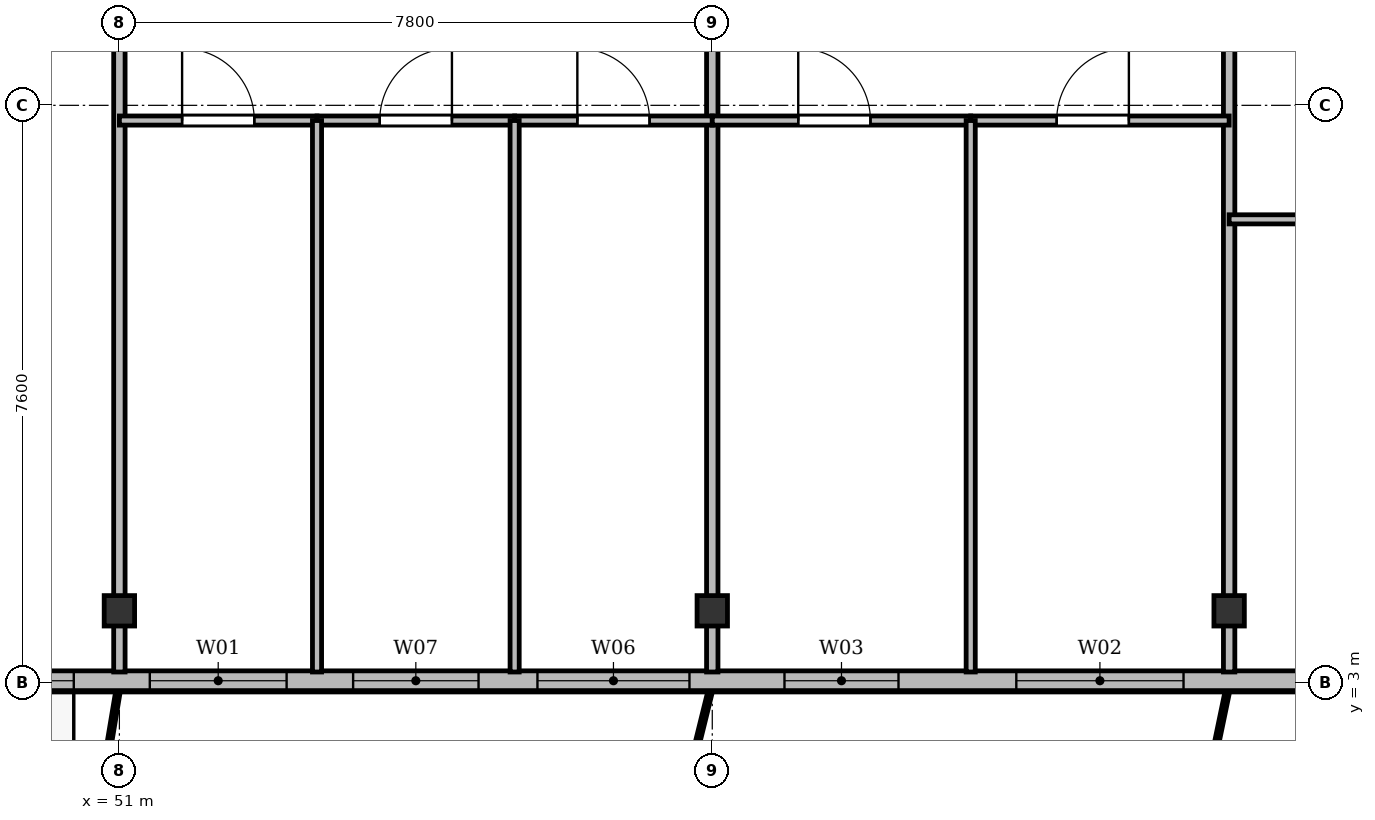
"""IFC4 building model, lengths in metres.
Left out: names, types, materials, properties, quantities, classifications, styles, units other than length and angle.
Written with IfcOpenShell. Run it as: python <this file> out.ifc"""

import sys

from ifc_helpers import new_model, si_unit, direction, frame, frame_2d, origin, origin_2d, place, context, subcontext, project, spatial, rectangle, i_section, extrude, source, transform, mapped, element, fill, save


model = new_model("IFC4")
c1 = context("Model", 3, precision=1e-05, world=origin(), true_north=direction((0.0, 1.0)))
c2 = subcontext(c1, "Body", "Model", "MODEL_VIEW")
j1 = project(units=[si_unit("LENGTHUNIT", "METRE"), si_unit("PLANEANGLEUNIT", "RADIAN")], contexts=[c1])
p1 = place(None, origin())
s1 = spatial("IfcSite", under=j1, at=p1, CompositionType="ELEMENT")
p2 = place(p1, origin())
s2 = spatial("IfcBuilding", under=s1, at=p2, CompositionType="ELEMENT")
p3 = place(p2, frame((0.0, 0.0, 99.7)))
s3 = spatial("IfcBuildingStorey", under=s2, at=p3, CompositionType="ELEMENT", Elevation=99.7)
m1 = source(origin(), c2, "Body", "SweptSolid", [
    extrude(i_section(OverallWidth=0.4, OverallDepth=0.4, WebThickness=0.022, FlangeThickness=0.035, at=origin_2d()), origin(), (0.0, 0.0, 1.0), 3.6),
])
for number, where, z_axis, x_axis in (
    (1, (51.0, 3.95, 0.0), (0.0, 0.0, 1.0), (1.0, 0.0, 0.0)),
    (2, (58.8, 3.95, 0.0), (0.0, 0.0, 1.0), (1.0, 0.0, 0.0)),
    (3, (65.6, 3.95, 0.0), (0.0, 0.0, 1.0), (1.0, 0.0, 0.0)),
):
    element("IfcColumn", number, at=place(p3, frame(where, z_axis=z_axis, x_axis=x_axis)), inside=s3, PredefinedType="COLUMN", context=c2, shape_type="MappedRepresentation", body=[
        mapped(m1, transform((0.0, 0.0, 0.0), x_axis=(1.0, 0.0, 0.0), y_axis=(0.0, 1.0, 0.0), z_axis=(0.0, 0.0, 1.0), scale=1.0)),
    ])
p4 = place(p3, frame((66.9, 3.03, 0.0), z_axis=(0.0, 0.0, 1.0), x_axis=(-1.0, 0.0, 0.0)))
e4 = element("IfcWall", 4, at=p4, inside=s3, PredefinedType="SOLIDWALL", context=c2, shape_type="SweptSolid", body=[
    extrude(rectangle(XDim=59.4, YDim=0.26, at=frame_2d((29.7, 0.0))), origin(), (0.0, 0.0, 1.0), 3.34),
])
p5 = place(p4, frame((1.9, 0.0, 0.9)))
e5 = element("IfcOpeningElement", 5, at=p5, cuts=e4, PredefinedType="OPENING", context=c2, shape_type="SweptSolid", body=[
    extrude(rectangle(XDim=2.2, YDim=1.8, at=frame_2d((1.1, 0.9))), frame((0.0, 0.14, 0.0), z_axis=(0.0, -1.0, 0.0), x_axis=(1.0, 0.0, 0.0)), (0.0, 0.0, 1.0), 0.28),
])
p6 = place(p4, frame((5.65, 0.0, 0.9)))
e6 = element("IfcOpeningElement", 6, at=p6, cuts=e4, PredefinedType="OPENING", context=c2, shape_type="SweptSolid", body=[
    extrude(rectangle(XDim=1.5, YDim=1.75, at=frame_2d((0.75, 0.875))), frame((0.0, 0.14, 0.0), z_axis=(0.0, -1.0, 0.0), x_axis=(1.0, 0.0, 0.0)), (0.0, 0.0, 1.0), 0.28),
])
p7 = place(p4, frame((8.4, 0.0, 0.9)))
e7 = element("IfcOpeningElement", 7, at=p7, cuts=e4, PredefinedType="OPENING", context=c2, shape_type="SweptSolid", body=[
    extrude(rectangle(XDim=2.0, YDim=1.95, at=frame_2d((1.0, 0.975))), frame((0.0, 0.14, 0.0), z_axis=(0.0, -1.0, 0.0), x_axis=(1.0, 0.0, 0.0)), (0.0, 0.0, 1.0), 0.28),
])
p8 = place(p4, frame((11.175, 0.0, 0.9)))
e8 = element("IfcOpeningElement", 8, at=p8, cuts=e4, PredefinedType="OPENING", context=c2, shape_type="SweptSolid", body=[
    extrude(rectangle(XDim=1.65, YDim=1.85, at=frame_2d((0.825, 0.925))), frame((0.0, 0.14, 0.0), z_axis=(0.0, -1.0, 0.0), x_axis=(1.0, 0.0, 0.0)), (0.0, 0.0, 1.0), 0.28),
])
p9 = place(p4, frame((13.7, 0.0, 0.9)))
e9 = element("IfcOpeningElement", 9, at=p9, cuts=e4, PredefinedType="OPENING", context=c2, shape_type="SweptSolid", body=[
    extrude(rectangle(XDim=1.8, YDim=1.8, at=frame_2d((0.9, 0.9))), frame((0.0, 0.14, 0.0), z_axis=(0.0, -1.0, 0.0), x_axis=(1.0, 0.0, 0.0)), (0.0, 0.0, 1.0), 0.28),
])
p10 = place(p4, frame((16.5, 0.0, 0.9)))
e10 = element("IfcOpeningElement", 10, at=p10, cuts=e4, PredefinedType="OPENING", context=c2, shape_type="SweptSolid", body=[
    extrude(rectangle(XDim=2.2, YDim=1.8, at=frame_2d((1.1, 0.9))), frame((0.0, 0.14, 0.0), z_axis=(0.0, -1.0, 0.0), x_axis=(1.0, 0.0, 0.0)), (0.0, 0.0, 1.0), 0.28),
])
p11 = place(p4, frame((20.227, 0.0, 0.0)))
e11 = element("IfcOpeningElement", 11, at=p11, cuts=e4, PredefinedType="OPENING", context=c2, shape_type="SweptSolid", body=[
    extrude(rectangle(XDim=1.2, YDim=2.2, at=frame_2d((0.6, 1.1))), frame((0.0, 0.14, 0.0), z_axis=(0.0, -1.0, 0.0), x_axis=(1.0, 0.0, 0.0)), (0.0, 0.0, 1.0), 0.28),
])
p12 = place(p4, frame((28.7, 0.0, 0.9)))
e12 = element("IfcOpeningElement", 12, at=p12, cuts=e4, PredefinedType="OPENING", context=c2, shape_type="SweptSolid", body=[
    extrude(rectangle(XDim=2.0, YDim=1.95, at=frame_2d((1.0, 0.975))), frame((0.0, 0.14, 0.0), z_axis=(0.0, -1.0, 0.0), x_axis=(1.0, 0.0, 0.0)), (0.0, 0.0, 1.0), 0.28),
])
p13 = place(p4, frame((36.675, 0.0, 0.9)))
e13 = element("IfcOpeningElement", 13, at=p13, cuts=e4, PredefinedType="OPENING", context=c2, shape_type="SweptSolid", body=[
    extrude(rectangle(XDim=1.65, YDim=1.85, at=frame_2d((0.825, 0.925))), frame((0.0, 0.14, 0.0), z_axis=(0.0, -1.0, 0.0), x_axis=(1.0, 0.0, 0.0)), (0.0, 0.0, 1.0), 0.28),
])
p14 = place(p4, frame((39.0, 0.0, 0.9)))
e14 = element("IfcOpeningElement", 14, at=p14, cuts=e4, PredefinedType="OPENING", context=c2, shape_type="SweptSolid", body=[
    extrude(rectangle(XDim=1.8, YDim=1.8, at=frame_2d((0.9, 0.9))), frame((0.0, 0.14, 0.0), z_axis=(0.0, -1.0, 0.0), x_axis=(1.0, 0.0, 0.0)), (0.0, 0.0, 1.0), 0.28),
])
p15 = place(p4, frame((41.55, 0.0, 0.9)))
e15 = element("IfcOpeningElement", 15, at=p15, cuts=e4, PredefinedType="OPENING", context=c2, shape_type="SweptSolid", body=[
    extrude(rectangle(XDim=1.5, YDim=1.75, at=frame_2d((0.75, 0.875))), frame((0.0, 0.14, 0.0), z_axis=(0.0, -1.0, 0.0), x_axis=(1.0, 0.0, 0.0)), (0.0, 0.0, 1.0), 0.28),
])
p16 = place(p4, frame((45.36, 0.0, 0.0)))
e16 = element("IfcOpeningElement", 16, at=p16, cuts=e4, PredefinedType="OPENING", context=c2, shape_type="SweptSolid", body=[
    extrude(rectangle(XDim=1.2, YDim=2.2, at=frame_2d((0.6, 1.1))), frame((0.0, 0.14, 0.0), z_axis=(0.0, -1.0, 0.0), x_axis=(1.0, 0.0, 0.0)), (0.0, 0.0, 1.0), 0.28),
])
p17 = place(p4, frame((48.3, 0.0, 0.9)))
e17 = element("IfcOpeningElement", 17, at=p17, cuts=e4, PredefinedType="OPENING", context=c2, shape_type="SweptSolid", body=[
    extrude(rectangle(XDim=2.0, YDim=1.95, at=frame_2d((1.0, 0.975))), frame((0.0, 0.14, 0.0), z_axis=(0.0, -1.0, 0.0), x_axis=(1.0, 0.0, 0.0)), (0.0, 0.0, 1.0), 0.28),
])
p18 = place(p4, frame((52.175, 0.0, 0.9)))
e18 = element("IfcOpeningElement", 18, at=p18, cuts=e4, PredefinedType="OPENING", context=c2, shape_type="SweptSolid", body=[
    extrude(rectangle(XDim=1.65, YDim=1.85, at=frame_2d((0.825, 0.925))), frame((0.0, 0.14, 0.0), z_axis=(0.0, -1.0, 0.0), x_axis=(1.0, 0.0, 0.0)), (0.0, 0.0, 1.0), 0.28),
])
p19 = place(p4, frame((55.5, 0.0, 0.9)))
e19 = element("IfcOpeningElement", 19, at=p19, cuts=e4, PredefinedType="OPENING", context=c2, shape_type="SweptSolid", body=[
    extrude(rectangle(XDim=1.8, YDim=1.8, at=frame_2d((0.9, 0.9))), frame((0.0, 0.14, 0.0), z_axis=(0.0, -1.0, 0.0), x_axis=(1.0, 0.0, 0.0)), (0.0, 0.0, 1.0), 0.28),
])
for number, where, z_axis, x_axis in (
    (20, (51.0, 3.145, 0.0), (0.0, 0.0, 1.0), (0.0, 1.0, 0.0)),
    (21, (58.8, 3.145, 0.0), (0.0, 0.0, 1.0), (0.0, 1.0, 0.0)),
    (22, (65.6, 3.145, 0.0), (0.0, 0.0, 1.0), (0.0, 1.0, 0.0)),
):
    element("IfcWall", number, at=place(p3, frame(where, z_axis=z_axis, x_axis=x_axis)), inside=s3, PredefinedType="PARTITIONING", context=c2, shape_type="SweptSolid", body=[
        extrude(rectangle(XDim=24.455, YDim=0.15, at=frame_2d((12.228, 0.0))), origin(), (0.0, 0.0, 1.0), 2.84),
    ])
p20 = place(p3, frame((51.0, 10.4, 0.0), z_axis=(0.0, 0.0, 1.0), x_axis=(1.0, 0.0, 0.0)))
e23 = element("IfcWall", 23, at=p20, inside=s3, PredefinedType="PARTITIONING", context=c2, shape_type="SweptSolid", body=[
    extrude(rectangle(XDim=2.6, YDim=0.12, at=frame_2d((1.3, 0.0))), origin(), (0.0, 0.0, 1.0), 2.84),
])
p21 = place(p20, frame((0.825, 0.0, 0.0)))
e24 = element("IfcOpeningElement", 24, at=p21, cuts=e23, PredefinedType="OPENING", context=c2, shape_type="SweptSolid", body=[
    extrude(rectangle(XDim=0.95, YDim=2.15, at=frame_2d((0.475, 1.075))), frame((0.0, 0.07, 0.0), z_axis=(0.0, -1.0, 0.0), x_axis=(1.0, 0.0, 0.0)), (0.0, 0.0, 1.0), 0.14),
])
p22 = place(p3, frame((53.6, 10.4, 0.0), z_axis=(0.0, 0.0, 1.0), x_axis=(1.0, 0.0, 0.0)))
e25 = element("IfcWall", 25, at=p22, inside=s3, PredefinedType="PARTITIONING", context=c2, shape_type="SweptSolid", body=[
    extrude(rectangle(XDim=2.6, YDim=0.12, at=frame_2d((1.3, 0.0))), origin(), (0.0, 0.0, 1.0), 3.34),
])
p23 = place(p22, frame((0.825, 0.0, 0.0)))
e26 = element("IfcOpeningElement", 26, at=p23, cuts=e25, PredefinedType="OPENING", context=c2, shape_type="SweptSolid", body=[
    extrude(rectangle(XDim=0.95, YDim=2.15, at=frame_2d((0.475, 1.075))), frame((0.0, 0.07, 0.0), z_axis=(0.0, -1.0, 0.0), x_axis=(1.0, 0.0, 0.0)), (0.0, 0.0, 1.0), 0.14),
])
p24 = place(p3, frame((53.6, 3.145, 0.0), z_axis=(0.0, 0.0, 1.0), x_axis=(0.0, 1.0, 0.0)))
e27 = element("IfcWall", 27, at=p24, inside=s3, PredefinedType="PARTITIONING", context=c2, shape_type="SweptSolid", body=[
    extrude(rectangle(XDim=7.255, YDim=0.12, at=frame_2d((3.627, 0.0))), origin(), (0.0, 0.0, 1.0), 2.752),
])
p25 = place(p3, frame((56.2, 10.4, 0.0), z_axis=(0.0, 0.0, 1.0), x_axis=(1.0, 0.0, 0.0)))
e28 = element("IfcWall", 28, at=p25, inside=s3, PredefinedType="PARTITIONING", context=c2, shape_type="SweptSolid", body=[
    extrude(rectangle(XDim=2.6, YDim=0.12, at=frame_2d((1.3, 0.0))), origin(), (0.0, 0.0, 1.0), 2.84),
])
p26 = place(p25, frame((0.825, 0.0, 0.0)))
e29 = element("IfcOpeningElement", 29, at=p26, cuts=e28, PredefinedType="OPENING", context=c2, shape_type="SweptSolid", body=[
    extrude(rectangle(XDim=0.95, YDim=2.15, at=frame_2d((0.475, 1.075))), frame((0.0, 0.07, 0.0), z_axis=(0.0, -1.0, 0.0), x_axis=(1.0, 0.0, 0.0)), (0.0, 0.0, 1.0), 0.14),
])
p27 = place(p3, frame((56.2, 3.145, 0.0), z_axis=(0.0, 0.0, 1.0), x_axis=(0.0, 1.0, 0.0)))
e30 = element("IfcWall", 30, at=p27, inside=s3, PredefinedType="PARTITIONING", context=c2, shape_type="SweptSolid", body=[
    extrude(rectangle(XDim=7.255, YDim=0.12, at=frame_2d((3.627, 0.0))), origin(), (0.0, 0.0, 1.0), 2.752),
])
p28 = place(p3, frame((58.8, 10.4, 0.0), z_axis=(0.0, 0.0, 1.0), x_axis=(1.0, 0.0, 0.0)))
e31 = element("IfcWall", 31, at=p28, inside=s3, PredefinedType="PARTITIONING", context=c2, shape_type="SweptSolid", body=[
    extrude(rectangle(XDim=3.4, YDim=0.12, at=frame_2d((1.7, 0.0))), origin(), (0.0, 0.0, 1.0), 2.84),
])
p29 = place(p28, frame((1.131, 0.0, 0.0)))
e32 = element("IfcOpeningElement", 32, at=p29, cuts=e31, PredefinedType="OPENING", context=c2, shape_type="SweptSolid", body=[
    extrude(rectangle(XDim=0.95, YDim=2.15, at=frame_2d((0.475, 1.075))), frame((0.0, 0.07, 0.0), z_axis=(0.0, -1.0, 0.0), x_axis=(1.0, 0.0, 0.0)), (0.0, 0.0, 1.0), 0.14),
])
p30 = place(p3, frame((62.2, 10.4, 0.0), z_axis=(0.0, 0.0, 1.0), x_axis=(1.0, 0.0, 0.0)))
e33 = element("IfcWall", 33, at=p30, inside=s3, PredefinedType="PARTITIONING", context=c2, shape_type="SweptSolid", body=[
    extrude(rectangle(XDim=3.4, YDim=0.12, at=frame_2d((1.7, 0.0))), origin(), (0.0, 0.0, 1.0), 2.84),
])
p31 = place(p30, frame((1.131, 0.0, 0.0)))
e34 = element("IfcOpeningElement", 34, at=p31, cuts=e33, PredefinedType="OPENING", context=c2, shape_type="SweptSolid", body=[
    extrude(rectangle(XDim=0.95, YDim=2.15, at=frame_2d((0.475, 1.075))), frame((0.0, 0.07, 0.0), z_axis=(0.0, -1.0, 0.0), x_axis=(1.0, 0.0, 0.0)), (0.0, 0.0, 1.0), 0.14),
])
p32 = place(p3, frame((62.2, 3.145, 0.0), z_axis=(0.0, 0.0, 1.0), x_axis=(0.0, 1.0, 0.0)))
e35 = element("IfcWall", 35, at=p32, inside=s3, PredefinedType="PARTITIONING", context=c2, shape_type="SweptSolid", body=[
    extrude(rectangle(XDim=7.255, YDim=0.12, at=frame_2d((3.627, 0.0))), origin(), (0.0, 0.0, 1.0), 2.752),
])
p33 = place(p3, frame((65.6, 9.1, 0.0), z_axis=(0.0, 0.0, 1.0), x_axis=(1.0, 0.0, 0.0)))
e36 = element("IfcWall", 36, at=p33, inside=s3, PredefinedType="PARTITIONING", context=c2, shape_type="SweptSolid", body=[
    extrude(rectangle(XDim=4.04, YDim=0.12, at=frame_2d((2.02, 0.0))), origin(), (0.0, 0.0, 1.0), 2.84),
])
p34 = place(p33, frame((1.545, 0.0, 0.0)))
e37 = element("IfcOpeningElement", 37, at=p34, cuts=e36, PredefinedType="OPENING", context=c2, shape_type="SweptSolid", body=[
    extrude(rectangle(XDim=0.95, YDim=2.15, at=frame_2d((0.475, 1.075))), frame((0.0, 0.07, 0.0), z_axis=(0.0, -1.0, 0.0), x_axis=(1.0, 0.0, 0.0)), (0.0, 0.0, 1.0), 0.14),
])
m2 = source(origin(), c2, "Body", "SweptSolid", [
    extrude(rectangle(XDim=2.2, YDim=1.8, at=frame_2d((1.1, 0.9))), frame((0.0, 0.03, 0.0), z_axis=(0.0, -1.0, 0.0), x_axis=(1.0, 0.0, 0.0)), (0.0, 0.0, 1.0), 0.06),
])
p35 = place(p5, origin())
e38 = element("IfcWindow", 38, at=p35, inside=s3, PartitioningType="SINGLE_PANEL", PredefinedType="WINDOW", context=c2, shape_type="MappedRepresentation", body=[
    mapped(m2, transform((0.0, 0.0, 0.0), x_axis=(1.0, 0.0, 0.0), y_axis=(0.0, 1.0, 0.0), z_axis=(0.0, 0.0, 1.0), scale=1.0)),
])
fill(e5, e38)
m3 = source(origin(), c2, "Body", "SweptSolid", [
    extrude(rectangle(XDim=1.5, YDim=1.75, at=frame_2d((0.75, 0.875))), frame((0.0, 0.03, 0.0), z_axis=(0.0, -1.0, 0.0), x_axis=(1.0, 0.0, 0.0)), (0.0, 0.0, 1.0), 0.06),
])
p36 = place(p6, origin())
e39 = element("IfcWindow", 39, at=p36, inside=s3, PartitioningType="SINGLE_PANEL", PredefinedType="WINDOW", context=c2, shape_type="MappedRepresentation", body=[
    mapped(m3, transform((0.0, 0.0, 0.0), x_axis=(1.0, 0.0, 0.0), y_axis=(0.0, 1.0, 0.0), z_axis=(0.0, 0.0, 1.0), scale=1.0)),
])
fill(e6, e39)
m4 = source(origin(), c2, "Body", "SweptSolid", [
    extrude(rectangle(XDim=2.0, YDim=1.95, at=frame_2d((1.0, 0.975))), frame((0.0, 0.03, 0.0), z_axis=(0.0, -1.0, 0.0), x_axis=(1.0, 0.0, 0.0)), (0.0, 0.0, 1.0), 0.06),
])
p37 = place(p7, origin())
e40 = element("IfcWindow", 40, at=p37, inside=s3, PartitioningType="SINGLE_PANEL", PredefinedType="WINDOW", context=c2, shape_type="MappedRepresentation", body=[
    mapped(m4, transform((0.0, 0.0, 0.0), x_axis=(1.0, 0.0, 0.0), y_axis=(0.0, 1.0, 0.0), z_axis=(0.0, 0.0, 1.0), scale=1.0)),
])
fill(e7, e40)
m5 = source(origin(), c2, "Body", "SweptSolid", [
    extrude(rectangle(XDim=1.65, YDim=1.85, at=frame_2d((0.825, 0.925))), frame((0.0, 0.03, 0.0), z_axis=(0.0, -1.0, 0.0), x_axis=(1.0, 0.0, 0.0)), (0.0, 0.0, 1.0), 0.06),
])
p38 = place(p8, origin())
e41 = element("IfcWindow", 41, at=p38, inside=s3, PartitioningType="SINGLE_PANEL", PredefinedType="WINDOW", context=c2, shape_type="MappedRepresentation", body=[
    mapped(m5, transform((0.0, 0.0, 0.0), x_axis=(1.0, 0.0, 0.0), y_axis=(0.0, 1.0, 0.0), z_axis=(0.0, 0.0, 1.0), scale=1.0)),
])
fill(e8, e41)
m6 = source(origin(), c2, "Body", "SweptSolid", [
    extrude(rectangle(XDim=1.8, YDim=1.8, at=frame_2d((0.9, 0.9))), frame((0.0, 0.03, 0.0), z_axis=(0.0, -1.0, 0.0), x_axis=(1.0, 0.0, 0.0)), (0.0, 0.0, 1.0), 0.06),
])
p39 = place(p9, origin())
e42 = element("IfcWindow", 42, at=p39, inside=s3, PartitioningType="SINGLE_PANEL", PredefinedType="WINDOW", context=c2, shape_type="MappedRepresentation", body=[
    mapped(m6, transform((0.0, 0.0, 0.0), x_axis=(1.0, 0.0, 0.0), y_axis=(0.0, 1.0, 0.0), z_axis=(0.0, 0.0, 1.0), scale=1.0)),
])
fill(e9, e42)
p40 = place(p10, origin())
e43 = element("IfcWindow", 43, at=p40, inside=s3, PartitioningType="SINGLE_PANEL", PredefinedType="WINDOW", context=c2, shape_type="MappedRepresentation", body=[
    mapped(m2, transform((0.0, 0.0, 0.0), x_axis=(1.0, 0.0, 0.0), y_axis=(0.0, 1.0, 0.0), z_axis=(0.0, 0.0, 1.0), scale=1.0)),
])
fill(e10, e43)
m7 = source(origin(), c2, "Body", "SweptSolid", [
    extrude(rectangle(XDim=0.95, YDim=2.15, at=frame_2d((0.475, 1.075))), frame((0.0, 0.025, 0.0), z_axis=(0.0, -1.0, 0.0), x_axis=(1.0, 0.0, 0.0)), (0.0, 0.0, 1.0), 0.05),
])
p41 = place(p21, origin())
e44 = element("IfcDoor", 44, at=p41, inside=s3, OperationType="SINGLE_SWING_LEFT", PredefinedType="DOOR", context=c2, shape_type="MappedRepresentation", body=[
    mapped(m7, transform((0.0, 0.0, 0.0), x_axis=(1.0, 0.0, 0.0), y_axis=(0.0, 1.0, 0.0), z_axis=(0.0, 0.0, 1.0), scale=1.0)),
])
fill(e24, e44)
p42 = place(p23, origin())
e45 = element("IfcDoor", 45, at=p42, inside=s3, OperationType="SINGLE_SWING_RIGHT", PredefinedType="DOOR", context=c2, shape_type="MappedRepresentation", body=[
    mapped(m7, transform((0.0, 0.0, 0.0), x_axis=(1.0, 0.0, 0.0), y_axis=(0.0, 1.0, 0.0), z_axis=(0.0, 0.0, 1.0), scale=1.0)),
])
fill(e26, e45)
p43 = place(p26, origin())
e46 = element("IfcDoor", 46, at=p43, inside=s3, OperationType="SINGLE_SWING_LEFT", PredefinedType="DOOR", context=c2, shape_type="MappedRepresentation", body=[
    mapped(m7, transform((0.0, 0.0, 0.0), x_axis=(1.0, 0.0, 0.0), y_axis=(0.0, 1.0, 0.0), z_axis=(0.0, 0.0, 1.0), scale=1.0)),
])
fill(e29, e46)
p44 = place(p29, origin())
e47 = element("IfcDoor", 47, at=p44, inside=s3, OperationType="SINGLE_SWING_LEFT", PredefinedType="DOOR", context=c2, shape_type="MappedRepresentation", body=[
    mapped(m7, transform((0.0, 0.0, 0.0), x_axis=(1.0, 0.0, 0.0), y_axis=(0.0, 1.0, 0.0), z_axis=(0.0, 0.0, 1.0), scale=1.0)),
])
fill(e32, e47)
p45 = place(p31, origin())
e48 = element("IfcDoor", 48, at=p45, inside=s3, OperationType="SINGLE_SWING_RIGHT", PredefinedType="DOOR", context=c2, shape_type="MappedRepresentation", body=[
    mapped(m7, transform((0.0, 0.0, 0.0), x_axis=(1.0, 0.0, 0.0), y_axis=(0.0, 1.0, 0.0), z_axis=(0.0, 0.0, 1.0), scale=1.0)),
])
fill(e34, e48)
save(model, sys.argv[1])
